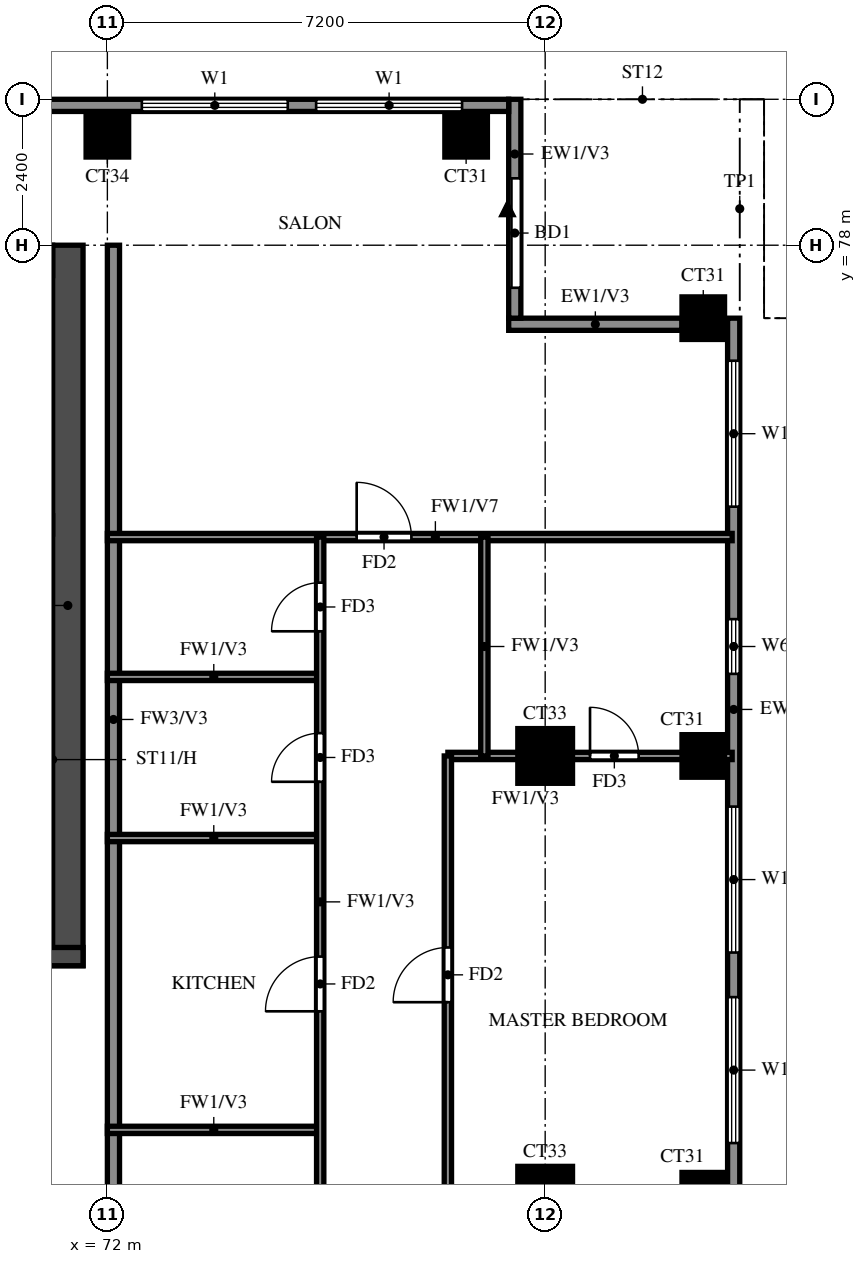
"""IFC4 building model, lengths in metres.
Left out: names, types, materials, properties, quantities, classifications, styles, units other than length and angle.
Written with IfcOpenShell. Run it as: python <this file> out.ifc"""

import sys

from ifc_helpers import new_model, si_unit, direction, frame, frame_2d, origin, origin_2d, place, context, subcontext, project, spatial, rectangle, extrude, source, transform, mapped, element, fill, save


model = new_model("IFC4")
c1 = context("Model", 3, precision=1e-05, world=origin(), true_north=direction((0.0, 1.0)))
c2 = subcontext(c1, "Body", "Model", "MODEL_VIEW")
j1 = project(units=[si_unit("LENGTHUNIT", "METRE"), si_unit("PLANEANGLEUNIT", "RADIAN")], contexts=[c1])
p1 = place(None, origin())
s1 = spatial("IfcSite", under=j1, at=p1, CompositionType="ELEMENT")
p2 = place(p1, origin())
s2 = spatial("IfcBuilding", under=s1, at=p2, CompositionType="ELEMENT")
p3 = place(p2, frame((0.0, 0.0, 211.5)))
s3 = spatial("IfcBuildingStorey", under=s2, at=p3, CompositionType="ELEMENT", Elevation=211.5)
m1 = source(origin(), c2, "Body", "SweptSolid", [
    extrude(rectangle(XDim=0.9, YDim=0.9, at=origin_2d()), origin(), (0.0, 0.0, 1.0), 3.22),
])
p4 = place(p3, frame((79.2, 62.4, 0.0), z_axis=(0.0, 0.0, 1.0), x_axis=(1.0, 0.0, 0.0)))
e1 = element("IfcColumn", 1, at=p4, inside=s3, PredefinedType="COLUMN", context=c2, shape_type="MappedRepresentation", body=[
    mapped(m1, transform((0.0, 0.0, 0.0))),
])
m2 = source(origin(), c2, "Body", "SweptSolid", [
    extrude(rectangle(XDim=0.7, YDim=0.7, at=origin_2d()), origin(), (0.0, 0.0, 1.0), 3.5),
])
p5 = place(p3, frame((81.8, 62.4, -0.28), z_axis=(0.0, 0.0, 1.0), x_axis=(1.0, 0.0, 0.0)))
e2 = element("IfcColumn", 2, at=p5, inside=s3, PredefinedType="COLUMN", context=c2, shape_type="MappedRepresentation", body=[
    mapped(m2, transform((0.0, 0.0, 0.0))),
])
p6 = place(p3, frame((79.2, 69.6, 0.0), z_axis=(0.0, 0.0, 1.0), x_axis=(1.0, 0.0, 0.0)))
e3 = element("IfcColumn", 3, at=p6, inside=s3, PredefinedType="COLUMN", context=c2, shape_type="MappedRepresentation", body=[
    mapped(m1, transform((0.0, 0.0, 0.0))),
])
for number, where, z_axis, x_axis in (
    (4, (81.8, 69.6, -0.28), (0.0, 0.0, 1.0), (1.0, 0.0, 0.0)),
    (5, (81.8, 76.8, -0.28), (0.0, 0.0, 1.0), (1.0, 0.0, 0.0)),
):
    element("IfcColumn", number, at=place(p3, frame(where, z_axis=z_axis, x_axis=x_axis)), inside=s3, PredefinedType="COLUMN", context=c2, shape_type="MappedRepresentation", body=[
        mapped(m2, transform((0.0, 0.0, 0.0))),
    ])
m3 = source(origin(), c2, "Body", "SweptSolid", [
    extrude(rectangle(XDim=0.7, YDim=0.7, at=origin_2d()), origin(), (0.0, 0.0, 1.0), 3.22),
])
p7 = place(p3, frame((72.0, 79.8, 0.0), z_axis=(0.0, 0.0, 1.0), x_axis=(1.0, 0.0, 0.0)))
e6 = element("IfcColumn", 6, at=p7, inside=s3, PredefinedType="COLUMN", context=c2, shape_type="MappedRepresentation", body=[
    mapped(m3, transform((0.0, 0.0, 0.0))),
])
p8 = place(p3, frame((77.9, 79.8, -0.28), z_axis=(0.0, 0.0, 1.0), x_axis=(1.0, 0.0, 0.0)))
e7 = element("IfcColumn", 7, at=p8, inside=s3, PredefinedType="COLUMN", context=c2, shape_type="MappedRepresentation", body=[
    mapped(m2, transform((0.0, 0.0, 0.0))),
])
p9 = place(p3, frame((71.35, 66.15, 0.0), z_axis=(0.0, 0.0, 1.0), x_axis=(0.0, 1.0, 0.0)))
e8 = element("IfcWall", 8, at=p9, inside=s3, PredefinedType="SHEAR", context=c2, shape_type="SweptSolid", body=[
    extrude(rectangle(XDim=11.85, YDim=0.5, at=frame_2d((5.925, 0.0))), origin(), (0.0, 0.0, 1.0), 3.22),
])
p10 = place(p3, frame((29.7, 77.75, 0.0), z_axis=(0.0, 0.0, 1.0), x_axis=(1.0, 0.0, 0.0)))
e9 = element("IfcWall", 9, at=p10, inside=s3, PredefinedType="SHEAR", context=c2, shape_type="SweptSolid", body=[
    extrude(rectangle(XDim=41.4, YDim=0.5, at=frame_2d((20.7, 0.0))), origin(), (0.0, 0.0, 1.0), 3.22),
])
p11 = place(p3, frame((29.2, 66.3, 0.0), z_axis=(0.0, 0.0, 1.0), x_axis=(1.0, 0.0, 0.0)))
e10 = element("IfcWall", 10, at=p11, inside=s3, PredefinedType="SHEAR", context=c2, shape_type="SweptSolid", body=[
    extrude(rectangle(XDim=42.4, YDim=0.3, at=frame_2d((21.2, 0.0))), origin(), (0.0, 0.0, 1.0), 3.22),
])
p12 = place(p11, frame((1.425, 0.0, 0.0)))
e11 = element("IfcOpeningElement", 11, at=p12, cuts=e10, PredefinedType="OPENING", context=c2, shape_type="SweptSolid", body=[
    extrude(rectangle(XDim=1.1, YDim=2.1, at=frame_2d((0.55, 1.05))), frame((0.0, 0.16, 0.0), z_axis=(0.0, -1.0, 0.0), x_axis=(1.0, 0.0, 0.0)), (0.0, 0.0, 1.0), 0.32),
])
p13 = place(p11, frame((4.2, 0.0, 0.0)))
e12 = element("IfcOpeningElement", 12, at=p13, cuts=e10, PredefinedType="OPENING", context=c2, shape_type="SweptSolid", body=[
    extrude(rectangle(XDim=1.8, YDim=2.1, at=frame_2d((0.9, 1.05))), frame((0.0, 0.16, 0.0), z_axis=(0.0, -1.0, 0.0), x_axis=(1.0, 0.0, 0.0)), (0.0, 0.0, 1.0), 0.32),
])
p14 = place(p3, frame((82.3, 48.2, 0.0), z_axis=(0.0, 0.0, 1.0), x_axis=(0.0, 1.0, 0.0)))
e13 = element("IfcWall", 13, at=p14, inside=s3, PredefinedType="SOLIDWALL", context=c2, shape_type="SweptSolid", body=[
    extrude(rectangle(XDim=28.6, YDim=0.2, at=frame_2d((14.3, 0.0))), origin(), (0.0, 0.0, 1.0), 3.22),
])
p15 = place(p14, frame((4.3, 0.0, 0.0)))
e14 = element("IfcOpeningElement", 14, at=p15, cuts=e13, PredefinedType="OPENING", context=c2, shape_type="SweptSolid", body=[
    extrude(rectangle(XDim=1.8, YDim=2.4, at=frame_2d((0.9, 1.2))), frame((0.0, 0.11, 0.0), z_axis=(0.0, -1.0, 0.0), x_axis=(1.0, 0.0, 0.0)), (0.0, 0.0, 1.0), 0.22),
])
p16 = place(p14, frame((0.6, 0.0, 0.6)))
e15 = element("IfcOpeningElement", 15, at=p16, cuts=e13, PredefinedType="OPENING", context=c2, shape_type="SweptSolid", body=[
    extrude(rectangle(XDim=2.4, YDim=2.4, at=frame_2d((1.2, 1.2))), frame((0.0, 0.11, 0.0), z_axis=(0.0, -1.0, 0.0), x_axis=(1.0, 0.0, 0.0)), (0.0, 0.0, 1.0), 0.22),
])
p17 = place(p14, frame((7.3, 0.0, 0.6)))
e16 = element("IfcOpeningElement", 16, at=p17, cuts=e13, PredefinedType="OPENING", context=c2, shape_type="SweptSolid", body=[
    extrude(rectangle(XDim=2.4, YDim=2.4, at=frame_2d((1.2, 1.2))), frame((0.0, 0.11, 0.0), z_axis=(0.0, -1.0, 0.0), x_axis=(1.0, 0.0, 0.0)), (0.0, 0.0, 1.0), 0.22),
])
p18 = place(p14, frame((11.2, 0.0, 0.6)))
e17 = element("IfcOpeningElement", 17, at=p18, cuts=e13, PredefinedType="OPENING", context=c2, shape_type="SweptSolid", body=[
    extrude(rectangle(XDim=2.4, YDim=2.4, at=frame_2d((1.2, 1.2))), frame((0.0, 0.11, 0.0), z_axis=(0.0, -1.0, 0.0), x_axis=(1.0, 0.0, 0.0)), (0.0, 0.0, 1.0), 0.22),
])
p19 = place(p14, frame((15.033, 0.0, 0.6)))
e18 = element("IfcOpeningElement", 18, at=p19, cuts=e13, PredefinedType="OPENING", context=c2, shape_type="SweptSolid", body=[
    extrude(rectangle(XDim=2.4, YDim=2.4, at=frame_2d((1.2, 1.2))), frame((0.0, 0.11, 0.0), z_axis=(0.0, -1.0, 0.0), x_axis=(1.0, 0.0, 0.0)), (0.0, 0.0, 1.0), 0.22),
])
p20 = place(p14, frame((18.167, 0.0, 0.6)))
e19 = element("IfcOpeningElement", 19, at=p20, cuts=e13, PredefinedType="OPENING", context=c2, shape_type="SweptSolid", body=[
    extrude(rectangle(XDim=2.4, YDim=2.4, at=frame_2d((1.2, 1.2))), frame((0.0, 0.11, 0.0), z_axis=(0.0, -1.0, 0.0), x_axis=(1.0, 0.0, 0.0)), (0.0, 0.0, 1.0), 0.22),
])
p21 = place(p14, frame((22.75, 0.0, 1.5)))
e20 = element("IfcOpeningElement", 20, at=p21, cuts=e13, PredefinedType="OPENING", context=c2, shape_type="SweptSolid", body=[
    extrude(rectangle(XDim=0.9, YDim=0.9, at=frame_2d((0.45, 0.45))), frame((0.0, 0.11, 0.0), z_axis=(0.0, -1.0, 0.0), x_axis=(1.0, 0.0, 0.0)), (0.0, 0.0, 1.0), 0.22),
])
p22 = place(p14, frame((25.5, 0.0, 0.6)))
e21 = element("IfcOpeningElement", 21, at=p22, cuts=e13, PredefinedType="OPENING", context=c2, shape_type="SweptSolid", body=[
    extrude(rectangle(XDim=2.4, YDim=2.4, at=frame_2d((1.2, 1.2))), frame((0.0, 0.11, 0.0), z_axis=(0.0, -1.0, 0.0), x_axis=(1.0, 0.0, 0.0)), (0.0, 0.0, 1.0), 0.22),
])
p23 = place(p3, frame((81.45, 76.7, 0.0), z_axis=(0.0, 0.0, 1.0), x_axis=(-1.0, 0.0, 0.0)))
e22 = element("IfcWall", 22, at=p23, inside=s3, PredefinedType="SOLIDWALL", context=c2, shape_type="SweptSolid", body=[
    extrude(rectangle(XDim=2.85, YDim=0.2, at=frame_2d((1.425, 0.0))), origin(), (0.0, 0.0, 1.0), 3.22),
])
p24 = place(p3, frame((78.7, 76.8, 0.0), z_axis=(0.0, 0.0, 1.0), x_axis=(0.0, 1.0, 0.0)))
e23 = element("IfcWall", 23, at=p24, inside=s3, PredefinedType="SOLIDWALL", context=c2, shape_type="SweptSolid", body=[
    extrude(rectangle(XDim=3.6, YDim=0.2, at=frame_2d((1.8, 0.0))), origin(), (0.0, 0.0, 1.0), 3.22),
])
p25 = place(p24, frame((0.5, 0.0, 0.0)))
e24 = element("IfcOpeningElement", 24, at=p25, cuts=e23, PredefinedType="OPENING", context=c2, shape_type="SweptSolid", body=[
    extrude(rectangle(XDim=1.8, YDim=2.4, at=frame_2d((0.9, 1.2))), frame((0.0, 0.11, 0.0), z_axis=(0.0, -1.0, 0.0), x_axis=(1.0, 0.0, 0.0)), (0.0, 0.0, 1.0), 0.22),
])
p26 = place(p3, frame((78.6, 80.3, 0.0), z_axis=(0.0, 0.0, 1.0), x_axis=(-1.0, 0.0, 0.0)))
e25 = element("IfcWall", 25, at=p26, inside=s3, PredefinedType="SOLIDWALL", context=c2, shape_type="SweptSolid", body=[
    extrude(rectangle(XDim=56.6, YDim=0.2, at=frame_2d((28.3, 0.0))), origin(), (0.0, 0.0, 1.0), 3.22),
])
p27 = place(p26, frame((50.433, 0.0, 0.6)))
e26 = element("IfcOpeningElement", 26, at=p27, cuts=e25, PredefinedType="OPENING", context=c2, shape_type="SweptSolid", body=[
    extrude(rectangle(XDim=2.4, YDim=2.4, at=frame_2d((1.2, 1.2))), frame((0.0, 0.11, 0.0), z_axis=(0.0, -1.0, 0.0), x_axis=(1.0, 0.0, 0.0)), (0.0, 0.0, 1.0), 0.22),
])
p28 = place(p26, frame((53.367, 0.0, 0.6)))
e27 = element("IfcOpeningElement", 27, at=p28, cuts=e25, PredefinedType="OPENING", context=c2, shape_type="SweptSolid", body=[
    extrude(rectangle(XDim=2.4, YDim=2.4, at=frame_2d((1.2, 1.2))), frame((0.0, 0.11, 0.0), z_axis=(0.0, -1.0, 0.0), x_axis=(1.0, 0.0, 0.0)), (0.0, 0.0, 1.0), 0.22),
])
p29 = place(p26, frame((0.767, 0.0, 0.6)))
e28 = element("IfcOpeningElement", 28, at=p29, cuts=e25, PredefinedType="OPENING", context=c2, shape_type="SweptSolid", body=[
    extrude(rectangle(XDim=2.4, YDim=2.4, at=frame_2d((1.2, 1.2))), frame((0.0, 0.11, 0.0), z_axis=(0.0, -1.0, 0.0), x_axis=(1.0, 0.0, 0.0)), (0.0, 0.0, 1.0), 0.22),
])
p30 = place(p26, frame((3.633, 0.0, 0.6)))
e29 = element("IfcOpeningElement", 29, at=p30, cuts=e25, PredefinedType="OPENING", context=c2, shape_type="SweptSolid", body=[
    extrude(rectangle(XDim=2.4, YDim=2.4, at=frame_2d((1.2, 1.2))), frame((0.0, 0.11, 0.0), z_axis=(0.0, -1.0, 0.0), x_axis=(1.0, 0.0, 0.0)), (0.0, 0.0, 1.0), 0.22),
])
p31 = place(p3, frame((72.1, 62.4, 0.0), z_axis=(0.0, 0.0, 1.0), x_axis=(0.0, 1.0, 0.0)))
e30 = element("IfcWall", 30, at=p31, inside=s3, PredefinedType="SOLIDWALL", context=c2, shape_type="SweptSolid", body=[
    extrude(rectangle(XDim=15.6, YDim=0.2, at=frame_2d((7.8, 0.0))), origin(), (0.0, 0.0, 1.0), 3.22),
])
for number, where, z_axis, x_axis in (
    (31, (72.0, 63.45, 0.0), (0.0, 0.0, 1.0), (1.0, 0.0, 0.0)),
    (32, (72.0, 68.25, 0.0), (0.0, 0.0, 1.0), (1.0, 0.0, 0.0)),
):
    element("IfcWall", number, at=place(p3, frame(where, z_axis=z_axis, x_axis=x_axis)), inside=s3, PredefinedType="PARTITIONING", context=c2, shape_type="SweptSolid", body=[
        extrude(rectangle(XDim=3.5, YDim=0.12, at=frame_2d((1.75, 0.0))), origin(), (0.0, 0.0, 1.0), 3.22),
    ])
p32 = place(p3, frame((77.6, 69.6, 0.0), z_axis=(0.0, 0.0, 1.0), x_axis=(1.0, 0.0, 0.0)))
e33 = element("IfcWall", 33, at=p32, inside=s3, PredefinedType="PARTITIONING", context=c2, shape_type="SweptSolid", body=[
    extrude(rectangle(XDim=4.675, YDim=0.12, at=frame_2d((2.337, 0.0))), origin(), (0.0, 0.0, 1.0), 3.22),
])
p33 = place(p32, frame((2.337, 0.0, 0.0)))
e34 = element("IfcOpeningElement", 34, at=p33, cuts=e33, PredefinedType="OPENING", context=c2, shape_type="SweptSolid", body=[
    extrude(rectangle(XDim=0.8, YDim=2.1, at=frame_2d((0.4, 1.05))), frame((0.0, 0.07, 0.0), z_axis=(0.0, -1.0, 0.0), x_axis=(1.0, 0.0, 0.0)), (0.0, 0.0, 1.0), 0.14),
])
p34 = place(p3, frame((72.0, 70.9, 0.0), z_axis=(0.0, 0.0, 1.0), x_axis=(1.0, 0.0, 0.0)))
e35 = element("IfcWall", 35, at=p34, inside=s3, PredefinedType="PARTITIONING", context=c2, shape_type="SweptSolid", body=[
    extrude(rectangle(XDim=3.5, YDim=0.12, at=frame_2d((1.75, 0.0))), origin(), (0.0, 0.0, 1.0), 3.22),
])
p35 = place(p3, frame((72.0, 73.2, 0.0), z_axis=(0.0, 0.0, 1.0), x_axis=(1.0, 0.0, 0.0)))
e36 = element("IfcWall", 36, at=p35, inside=s3, PredefinedType="PARTITIONING", context=c2, shape_type="SweptSolid", body=[
    extrude(rectangle(XDim=10.275, YDim=0.12, at=frame_2d((5.137, 0.0))), origin(), (0.0, 0.0, 1.0), 2.32),
])
p36 = place(p35, frame((4.1, 0.0, 0.0)))
e37 = element("IfcOpeningElement", 37, at=p36, cuts=e36, PredefinedType="OPENING", context=c2, shape_type="SweptSolid", body=[
    extrude(rectangle(XDim=0.9, YDim=2.1, at=frame_2d((0.45, 1.05))), frame((0.0, 0.07, 0.0), z_axis=(0.0, -1.0, 0.0), x_axis=(1.0, 0.0, 0.0)), (0.0, 0.0, 1.0), 0.14),
])
p37 = place(p3, frame((75.5, 61.2, 0.0), z_axis=(0.0, 0.0, 1.0), x_axis=(0.0, 1.0, 0.0)))
e38 = element("IfcWall", 38, at=p37, inside=s3, PredefinedType="PARTITIONING", context=c2, shape_type="SweptSolid", body=[
    extrude(rectangle(XDim=12.0, YDim=0.12, at=frame_2d((6.0, 0.0))), origin(), (0.0, 0.0, 1.0), 3.22),
])
p38 = place(p37, frame((4.2, 0.0, 0.0)))
e39 = element("IfcOpeningElement", 39, at=p38, cuts=e38, PredefinedType="OPENING", context=c2, shape_type="SweptSolid", body=[
    extrude(rectangle(XDim=0.9, YDim=2.1, at=frame_2d((0.45, 1.05))), frame((0.0, 0.07, 0.0), z_axis=(0.0, -1.0, 0.0), x_axis=(1.0, 0.0, 0.0)), (0.0, 0.0, 1.0), 0.14),
])
p39 = place(p37, frame((7.975, 0.0, 0.0)))
e40 = element("IfcOpeningElement", 40, at=p39, cuts=e38, PredefinedType="OPENING", context=c2, shape_type="SweptSolid", body=[
    extrude(rectangle(XDim=0.8, YDim=2.1, at=frame_2d((0.4, 1.05))), frame((0.0, 0.07, 0.0), z_axis=(0.0, -1.0, 0.0), x_axis=(1.0, 0.0, 0.0)), (0.0, 0.0, 1.0), 0.14),
])
p40 = place(p37, frame((10.45, 0.0, 0.0)))
e41 = element("IfcOpeningElement", 41, at=p40, cuts=e38, PredefinedType="OPENING", context=c2, shape_type="SweptSolid", body=[
    extrude(rectangle(XDim=0.8, YDim=2.1, at=frame_2d((0.4, 1.05))), frame((0.0, 0.07, 0.0), z_axis=(0.0, -1.0, 0.0), x_axis=(1.0, 0.0, 0.0)), (0.0, 0.0, 1.0), 0.14),
])
p41 = place(p3, frame((77.6, 48.125, 0.0), z_axis=(0.0, 0.0, 1.0), x_axis=(0.0, 1.0, 0.0)))
e42 = element("IfcWall", 42, at=p41, inside=s3, PredefinedType="PARTITIONING", context=c2, shape_type="SweptSolid", body=[
    extrude(rectangle(XDim=21.475, YDim=0.12, at=frame_2d((10.738, 0.0))), origin(), (0.0, 0.0, 1.0), 3.22),
])
p42 = place(p41, frame((1.288, 0.0, 0.0)))
e43 = element("IfcOpeningElement", 43, at=p42, cuts=e42, PredefinedType="OPENING", context=c2, shape_type="SweptSolid", body=[
    extrude(rectangle(XDim=0.9, YDim=2.1, at=frame_2d((0.45, 1.05))), frame((0.0, 0.07, 0.0), z_axis=(0.0, -1.0, 0.0), x_axis=(1.0, 0.0, 0.0)), (0.0, 0.0, 1.0), 0.14),
])
p43 = place(p41, frame((7.825, 0.0, 0.0)))
e44 = element("IfcOpeningElement", 44, at=p43, cuts=e42, PredefinedType="OPENING", context=c2, shape_type="SweptSolid", body=[
    extrude(rectangle(XDim=1.5, YDim=2.1, at=frame_2d((0.75, 1.05))), frame((0.0, 0.07, 0.0), z_axis=(0.0, -1.0, 0.0), x_axis=(1.0, 0.0, 0.0)), (0.0, 0.0, 1.0), 0.14),
])
p44 = place(p41, frame((12.025, 0.0, 0.0)))
e45 = element("IfcOpeningElement", 45, at=p44, cuts=e42, PredefinedType="OPENING", context=c2, shape_type="SweptSolid", body=[
    extrude(rectangle(XDim=0.9, YDim=2.1, at=frame_2d((0.45, 1.05))), frame((0.0, 0.07, 0.0), z_axis=(0.0, -1.0, 0.0), x_axis=(1.0, 0.0, 0.0)), (0.0, 0.0, 1.0), 0.14),
])
p45 = place(p41, frame((17.425, 0.0, 0.0)))
e46 = element("IfcOpeningElement", 46, at=p45, cuts=e42, PredefinedType="OPENING", context=c2, shape_type="SweptSolid", body=[
    extrude(rectangle(XDim=0.9, YDim=2.1, at=frame_2d((0.45, 1.05))), frame((0.0, 0.07, 0.0), z_axis=(0.0, -1.0, 0.0), x_axis=(1.0, 0.0, 0.0)), (0.0, 0.0, 1.0), 0.14),
])
p46 = place(p3, frame((78.2, 69.6, 0.0), z_axis=(0.0, 0.0, 1.0), x_axis=(0.0, 1.0, 0.0)))
e47 = element("IfcWall", 47, at=p46, inside=s3, PredefinedType="PARTITIONING", context=c2, shape_type="SweptSolid", body=[
    extrude(rectangle(XDim=3.6, YDim=0.12, at=frame_2d((1.8, 0.0))), origin(), (0.0, 0.0, 1.0), 3.22),
])
p47 = place(p19, origin())
e48 = element("IfcWindow", 48, at=p47, inside=s3, PartitioningType="DOUBLE_PANEL_VERTICAL", PredefinedType="WINDOW", context=c2, shape_type="SweptSolid", body=[
    extrude(rectangle(XDim=2.4, YDim=2.4, at=frame_2d((1.2, 1.2))), frame((0.0, 0.03, 0.0), z_axis=(0.0, -1.0, 0.0), x_axis=(1.0, 0.0, 0.0)), (0.0, 0.0, 1.0), 0.06),
])
fill(e18, e48)
p48 = place(p20, origin())
e49 = element("IfcWindow", 49, at=p48, inside=s3, PartitioningType="DOUBLE_PANEL_VERTICAL", PredefinedType="WINDOW", context=c2, shape_type="SweptSolid", body=[
    extrude(rectangle(XDim=2.4, YDim=2.4, at=frame_2d((1.2, 1.2))), frame((0.0, 0.03, 0.0), z_axis=(0.0, -1.0, 0.0), x_axis=(1.0, 0.0, 0.0)), (0.0, 0.0, 1.0), 0.06),
])
fill(e19, e49)
p49 = place(p21, origin())
e50 = element("IfcWindow", 50, at=p49, inside=s3, PartitioningType="SINGLE_PANEL", PredefinedType="WINDOW", context=c2, shape_type="SweptSolid", body=[
    extrude(rectangle(XDim=0.9, YDim=0.9, at=frame_2d((0.45, 0.45))), frame((0.0, 0.03, 0.0), z_axis=(0.0, -1.0, 0.0), x_axis=(1.0, 0.0, 0.0)), (0.0, 0.0, 1.0), 0.06),
])
fill(e20, e50)
p50 = place(p22, origin())
e51 = element("IfcWindow", 51, at=p50, inside=s3, PartitioningType="DOUBLE_PANEL_VERTICAL", PredefinedType="WINDOW", context=c2, shape_type="SweptSolid", body=[
    extrude(rectangle(XDim=2.4, YDim=2.4, at=frame_2d((1.2, 1.2))), frame((0.0, 0.03, 0.0), z_axis=(0.0, -1.0, 0.0), x_axis=(1.0, 0.0, 0.0)), (0.0, 0.0, 1.0), 0.06),
])
fill(e21, e51)
p51 = place(p25, origin())
e52 = element("IfcDoor", 52, at=p51, inside=s3, OperationType="DOUBLE_DOOR_SLIDING", PredefinedType="DOOR", context=c2, shape_type="SweptSolid", body=[
    extrude(rectangle(XDim=1.8, YDim=2.4, at=frame_2d((0.9, 1.2))), frame((0.0, 0.025, 0.0), z_axis=(0.0, -1.0, 0.0), x_axis=(1.0, 0.0, 0.0)), (0.0, 0.0, 1.0), 0.05),
])
fill(e24, e52)
p52 = place(p29, origin())
e53 = element("IfcWindow", 53, at=p52, inside=s3, PartitioningType="DOUBLE_PANEL_VERTICAL", PredefinedType="WINDOW", context=c2, shape_type="SweptSolid", body=[
    extrude(rectangle(XDim=2.4, YDim=2.4, at=frame_2d((1.2, 1.2))), frame((0.0, 0.03, 0.0), z_axis=(0.0, -1.0, 0.0), x_axis=(1.0, 0.0, 0.0)), (0.0, 0.0, 1.0), 0.06),
])
fill(e28, e53)
p53 = place(p30, origin())
e54 = element("IfcWindow", 54, at=p53, inside=s3, PartitioningType="DOUBLE_PANEL_VERTICAL", PredefinedType="WINDOW", context=c2, shape_type="SweptSolid", body=[
    extrude(rectangle(XDim=2.4, YDim=2.4, at=frame_2d((1.2, 1.2))), frame((0.0, 0.03, 0.0), z_axis=(0.0, -1.0, 0.0), x_axis=(1.0, 0.0, 0.0)), (0.0, 0.0, 1.0), 0.06),
])
fill(e29, e54)
p54 = place(p45, origin())
e55 = element("IfcDoor", 55, at=p54, inside=s3, OperationType="SINGLE_SWING_LEFT", PredefinedType="DOOR", context=c2, shape_type="SweptSolid", body=[
    extrude(rectangle(XDim=0.9, YDim=2.1, at=frame_2d((0.45, 1.05))), frame((0.0, 0.025, 0.0), z_axis=(0.0, -1.0, 0.0), x_axis=(1.0, 0.0, 0.0)), (0.0, 0.0, 1.0), 0.05),
])
fill(e46, e55)
p55 = place(p33, origin())
e56 = element("IfcDoor", 56, at=p55, inside=s3, OperationType="SINGLE_SWING_RIGHT", PredefinedType="DOOR", context=c2, shape_type="SweptSolid", body=[
    extrude(rectangle(XDim=0.8, YDim=2.1, at=frame_2d((0.4, 1.05))), frame((0.0, 0.025, 0.0), z_axis=(0.0, -1.0, 0.0), x_axis=(1.0, 0.0, 0.0)), (0.0, 0.0, 1.0), 0.05),
])
fill(e34, e56)
p56 = place(p36, origin())
e57 = element("IfcDoor", 57, at=p56, inside=s3, OperationType="SINGLE_SWING_RIGHT", PredefinedType="DOOR", context=c2, shape_type="SweptSolid", body=[
    extrude(rectangle(XDim=0.9, YDim=2.1, at=frame_2d((0.45, 1.05))), frame((0.0, 0.025, 0.0), z_axis=(0.0, -1.0, 0.0), x_axis=(1.0, 0.0, 0.0)), (0.0, 0.0, 1.0), 0.05),
])
fill(e37, e57)
p57 = place(p38, origin())
e58 = element("IfcDoor", 58, at=p57, inside=s3, OperationType="SINGLE_SWING_LEFT", PredefinedType="DOOR", context=c2, shape_type="SweptSolid", body=[
    extrude(rectangle(XDim=0.9, YDim=2.1, at=frame_2d((0.45, 1.05))), frame((0.0, 0.025, 0.0), z_axis=(0.0, -1.0, 0.0), x_axis=(1.0, 0.0, 0.0)), (0.0, 0.0, 1.0), 0.05),
])
fill(e39, e58)
p58 = place(p39, origin())
e59 = element("IfcDoor", 59, at=p58, inside=s3, OperationType="SINGLE_SWING_RIGHT", PredefinedType="DOOR", context=c2, shape_type="SweptSolid", body=[
    extrude(rectangle(XDim=0.8, YDim=2.1, at=frame_2d((0.4, 1.05))), frame((0.0, 0.025, 0.0), z_axis=(0.0, -1.0, 0.0), x_axis=(1.0, 0.0, 0.0)), (0.0, 0.0, 1.0), 0.05),
])
fill(e40, e59)
p59 = place(p40, origin())
e60 = element("IfcDoor", 60, at=p59, inside=s3, OperationType="SINGLE_SWING_LEFT", PredefinedType="DOOR", context=c2, shape_type="SweptSolid", body=[
    extrude(rectangle(XDim=0.8, YDim=2.1, at=frame_2d((0.4, 1.05))), frame((0.0, 0.025, 0.0), z_axis=(0.0, -1.0, 0.0), x_axis=(1.0, 0.0, 0.0)), (0.0, 0.0, 1.0), 0.05),
])
fill(e41, e60)
save(model, sys.argv[1])
